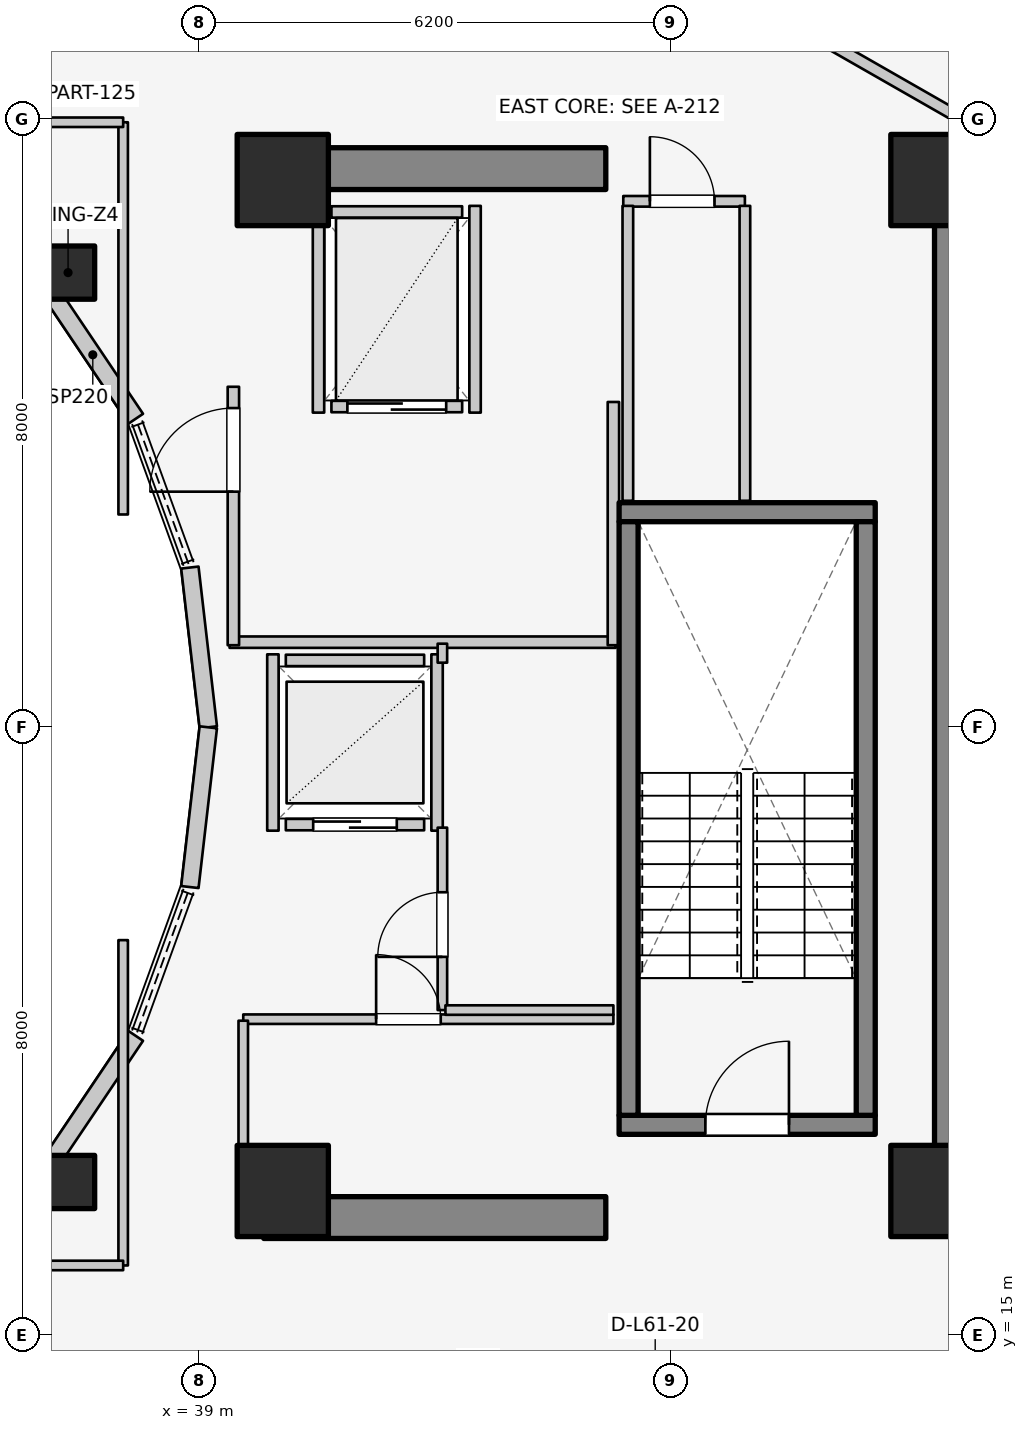
"""IFC4 building model, lengths in metres.
Left out: names, types, materials, properties, quantities, classifications, styles, units other than length and angle.
Written with IfcOpenShell. Run it as: python <this file> out.ifc"""

import sys

from ifc_helpers import new_model, si_unit, direction, frame, frame_2d, origin, origin_2d, place, context, subcontext, project, spatial, rectangle, extrude, element, fill, save


model = new_model("IFC4")
c1 = context("Model", 3, precision=1e-05, world=origin(), true_north=direction((0.0, 1.0)))
c2 = subcontext(c1, "Body", "Model", "MODEL_VIEW")
j1 = project(units=[si_unit("LENGTHUNIT", "METRE"), si_unit("PLANEANGLEUNIT", "RADIAN")], contexts=[c1])
p1 = place(None, origin())
s1 = spatial("IfcSite", under=j1, at=p1, CompositionType="ELEMENT")
p2 = place(p1, origin())
s2 = spatial("IfcBuilding", under=s1, at=p2, CompositionType="ELEMENT")
p3 = place(p2, frame((0.0, 0.0, 201.6)))
s3 = spatial("IfcBuildingStorey", under=s2, at=p3, CompositionType="ELEMENT", Elevation=201.6)
p4 = place(p3, frame((48.95, 17.05, 0.0), z_axis=(0.0, 0.0, 1.0), x_axis=(0.0, 1.0, 0.0)))
e1 = element("IfcWall", 1, at=p4, inside=s3, PredefinedType="SHEAR", context=c2, shape_type="SweptSolid", body=[
    extrude(rectangle(XDim=12.8, YDim=0.55, at=frame_2d((6.4, 0.0))), origin(), (0.0, 0.0, 1.0), 3.1),
])
for number, where, z_axis, x_axis in (
    (2, (39.85, 16.55, 0.0), (0.0, 0.0, 1.0), (1.0, 0.0, 0.0)),
    (3, (39.85, 30.35, 0.0), (0.0, 0.0, 1.0), (1.0, 0.0, 0.0)),
):
    element("IfcWall", number, at=place(p3, frame(where, z_axis=z_axis, x_axis=x_axis)), inside=s3, PredefinedType="SHEAR", context=c2, shape_type="SweptSolid", body=[
        extrude(rectangle(XDim=4.5, YDim=0.55, at=frame_2d((2.25, 0.0))), origin(), (0.0, 0.0, 1.0), 3.1),
    ])
p5 = place(p3, frame((44.525, 17.77, 0.0), z_axis=(0.0, 0.0, 1.0), x_axis=(1.0, 0.0, 0.0)))
e4 = element("IfcWall", 4, at=p5, inside=s3, PredefinedType="SOLIDWALL", context=c2, shape_type="SweptSolid", body=[
    extrude(rectangle(XDim=3.37, YDim=0.25, at=frame_2d((1.685, 0.0))), origin(), (0.0, 0.0, 1.0), 3.1),
])
p6 = place(p5, frame((1.135, 0.0, 0.0)))
e5 = element("IfcOpeningElement", 5, at=p6, cuts=e4, PredefinedType="OPENING", context=c2, shape_type="SweptSolid", body=[
    extrude(rectangle(XDim=1.1, YDim=2.1, at=frame_2d((0.55, 1.05))), frame((0.0, 0.135, 0.0), z_axis=(0.0, -1.0, 0.0), x_axis=(1.0, 0.0, 0.0)), (0.0, 0.0, 1.0), 0.27),
])
p7 = place(p3, frame((44.525, 25.83, 0.0), z_axis=(0.0, 0.0, 1.0), x_axis=(1.0, 0.0, 0.0)))
e6 = element("IfcWall", 6, at=p7, inside=s3, PredefinedType="SOLIDWALL", context=c2, shape_type="SweptSolid", body=[
    extrude(rectangle(XDim=3.37, YDim=0.25, at=frame_2d((1.685, 0.0))), origin(), (0.0, 0.0, 1.0), 3.1),
])
for number, where, z_axis, x_axis in (
    (7, (44.65, 17.895, 0.0), (0.0, 0.0, 1.0), (0.0, 1.0, 0.0)),
    (8, (47.77, 17.895, 0.0), (0.0, 0.0, 1.0), (0.0, 1.0, 0.0)),
):
    element("IfcWall", number, at=place(p3, frame(where, z_axis=z_axis, x_axis=x_axis)), inside=s3, PredefinedType="SOLIDWALL", context=c2, shape_type="SweptSolid", body=[
        extrude(rectangle(XDim=7.81, YDim=0.25, at=frame_2d((3.905, 0.0))), origin(), (0.0, 0.0, 1.0), 3.1),
    ])
for number, where, z_axis, x_axis in (
    (9, (40.1, 16.9, 0.0), (0.0, 0.0, 1.0), (1.0, 0.0, 0.0)),
    (10, (48.7, 16.9, 0.0), (0.0, 0.0, 1.0), (1.0, 0.0, 0.0)),
    (11, (48.7, 30.2, 0.0), (0.0, 0.0, 1.0), (1.0, 0.0, 0.0)),
    (12, (40.1, 30.2, 0.0), (0.0, 0.0, 1.0), (1.0, 0.0, 0.0)),
):
    element("IfcColumn", number, at=place(p3, frame(where, z_axis=z_axis, x_axis=x_axis)), inside=s3, PredefinedType="COLUMN", context=c2, shape_type="SweptSolid", body=[
        extrude(rectangle(XDim=1.2, YDim=1.2, at=origin_2d()), origin(), (0.0, 0.0, 1.0), 3.1),
    ])
for number, where, z_axis, x_axis in (
    (13, (37.275, 28.982, 0.0), (0.0, 0.0, 1.0), (1.0, 0.0, 0.0)),
    (14, (37.275, 17.018, 0.0), (0.0, 0.0, 1.0), (1.0, 0.0, 0.0)),
):
    element("IfcColumn", number, at=place(p3, frame(where, z_axis=z_axis, x_axis=x_axis)), inside=s3, PredefinedType="COLUMN", context=c2, shape_type="SweptSolid", body=[
        extrude(rectangle(XDim=0.7, YDim=0.7, at=origin_2d()), origin(), (0.0, 0.0, 1.0), 3.1),
    ])
p8 = place(p3, frame((39.12, 23.0, 0.0), z_axis=(0.0, 0.0, 1.0), x_axis=(-0.114711713601, 0.993398823617, 0.0)))
e15 = element("IfcWall", 15, at=p8, inside=s3, PredefinedType="STANDARD", context=c2, shape_type="SweptSolid", body=[
    extrude(rectangle(XDim=2.115, YDim=0.23, at=frame_2d((1.058, 0.0))), origin(), (0.0, 0.0, 1.0), 2.84),
])
p9 = place(p3, frame((38.166, 27.06, 0.0), z_axis=(0.0, 0.0, 1.0), x_axis=(-0.558197800898, 0.829707909492, 0.0)))
e16 = element("IfcWall", 16, at=p9, inside=s3, PredefinedType="STANDARD", context=c2, shape_type="SweptSolid", body=[
    extrude(rectangle(XDim=2.027, YDim=0.23, at=frame_2d((1.013, 0.0))), origin(), (0.0, 0.0, 1.0), 2.16),
])
for number, where, z_axis, x_axis in (
    (17, (37.035, 28.742, 0.0), (0.0, 0.0, 1.0), (-0.753, 0.659, 0.0)),
    (18, (35.56, 15.968, 0.0), (0.0, 0.0, 1.0), (0.753, 0.659, 0.0)),
):
    element("IfcWall", number, at=place(p3, frame(where, z_axis=z_axis, x_axis=x_axis)), inside=s3, PredefinedType="STANDARD", context=c2, shape_type="SweptSolid", body=[
        extrude(rectangle(XDim=1.959, YDim=0.23, at=frame_2d((0.98, 0.0))), origin(), (0.0, 0.0, 1.0), 2.16),
    ])
p10 = place(p3, frame((37.035, 17.258, 0.0), z_axis=(0.0, 0.0, 1.0), x_axis=(0.558197800898, 0.829707909492, 0.0)))
e19 = element("IfcWall", 19, at=p10, inside=s3, PredefinedType="STANDARD", context=c2, shape_type="SweptSolid", body=[
    extrude(rectangle(XDim=2.027, YDim=0.23, at=frame_2d((1.013, 0.0))), origin(), (0.0, 0.0, 1.0), 2.16),
])
p11 = place(p3, frame((38.877, 20.898, 0.0), z_axis=(0.0, 0.0, 1.0), x_axis=(0.114711713601, 0.993398823617, 0.0)))
e20 = element("IfcWall", 20, at=p11, inside=s3, PredefinedType="STANDARD", context=c2, shape_type="SweptSolid", body=[
    extrude(rectangle(XDim=2.115, YDim=0.23, at=frame_2d((1.058, 0.0))), origin(), (0.0, 0.0, 1.0), 2.84),
])
p12 = place(p3, frame((50.761, 31.809, 0.0), z_axis=(0.0, 0.0, 1.0), x_axis=(-0.792713817907, 0.609593965603, 0.0)))
e21 = element("IfcWall", 21, at=p12, inside=s3, PredefinedType="STANDARD", context=c2, shape_type="SweptSolid", body=[
    extrude(rectangle(XDim=4.041, YDim=0.26, at=frame_2d((2.021, 0.0))), origin(), (0.0, 0.0, 1.0), 2.85),
])
p13 = place(p12, frame((1.271, 0.0, 0.75)))
e22 = element("IfcOpeningElement", 22, at=p13, cuts=e21, PredefinedType="OPENING", context=c2, shape_type="SweptSolid", body=[
    extrude(rectangle(XDim=1.5, YDim=1.6, at=frame_2d((0.75, 0.8))), frame((0.0, 0.14, 0.0), z_axis=(0.0, -1.0, 0.0), x_axis=(1.0, 0.0, 0.0)), (0.0, 0.0, 1.0), 0.28),
])
p14 = place(p3, frame((40.14, 21.72, 0.0), z_axis=(0.0, 0.0, 1.0), x_axis=(1.0, 0.0, 0.0)))
e23 = element("IfcWall", 23, at=p14, inside=s3, PredefinedType="SOLIDWALL", context=c2, shape_type="SweptSolid", body=[
    extrude(rectangle(XDim=1.82, YDim=0.15, at=frame_2d((0.91, 0.0))), origin(), (0.0, 0.0, 1.0), 2.12),
])
p15 = place(p14, frame((0.36, 0.0, 0.0)))
e24 = element("IfcOpeningElement", 24, at=p15, cuts=e23, PredefinedType="OPENING", context=c2, shape_type="SweptSolid", body=[
    extrude(rectangle(XDim=1.1, YDim=2.1, at=frame_2d((0.55, 1.05))), frame((0.0, 0.085, 0.0), z_axis=(0.0, -1.0, 0.0), x_axis=(1.0, 0.0, 0.0)), (0.0, 0.0, 1.0), 0.17),
])
p16 = place(p3, frame((40.14, 23.88, 0.0), z_axis=(0.0, 0.0, 1.0), x_axis=(1.0, 0.0, 0.0)))
e25 = element("IfcWall", 25, at=p16, inside=s3, PredefinedType="SOLIDWALL", context=c2, shape_type="SweptSolid", body=[
    extrude(rectangle(XDim=1.82, YDim=0.15, at=frame_2d((0.91, 0.0))), origin(), (0.0, 0.0, 1.0), 2.12),
])
p17 = place(p3, frame((39.97, 21.64, 0.0), z_axis=(0.0, 0.0, 1.0), x_axis=(0.0, 1.0, 0.0)))
e26 = element("IfcWall", 26, at=p17, inside=s3, PredefinedType="SOLIDWALL", context=c2, shape_type="SweptSolid", body=[
    extrude(rectangle(XDim=2.32, YDim=0.15, at=frame_2d((1.16, 0.0))), origin(), (0.0, 0.0, 1.0), 2.12),
])
p18 = place(p3, frame((42.13, 21.64, 0.0), z_axis=(0.0, 0.0, 1.0), x_axis=(0.0, 1.0, 0.0)))
e27 = element("IfcWall", 27, at=p18, inside=s3, PredefinedType="SOLIDWALL", context=c2, shape_type="SweptSolid", body=[
    extrude(rectangle(XDim=2.32, YDim=0.15, at=frame_2d((1.16, 0.0))), origin(), (0.0, 0.0, 1.0), 2.855),
])
p19 = place(p3, frame((40.74, 27.22, 0.0), z_axis=(0.0, 0.0, 1.0), x_axis=(1.0, 0.0, 0.0)))
e28 = element("IfcWall", 28, at=p19, inside=s3, PredefinedType="SOLIDWALL", context=c2, shape_type="SweptSolid", body=[
    extrude(rectangle(XDim=1.72, YDim=0.15, at=frame_2d((0.86, 0.0))), origin(), (0.0, 0.0, 1.0), 2.855),
])
p20 = place(p19, frame((0.21, 0.0, 0.0)))
e29 = element("IfcOpeningElement", 29, at=p20, cuts=e28, PredefinedType="OPENING", context=c2, shape_type="SweptSolid", body=[
    extrude(rectangle(XDim=1.3, YDim=2.1, at=frame_2d((0.65, 1.05))), frame((0.0, 0.085, 0.0), z_axis=(0.0, -1.0, 0.0), x_axis=(1.0, 0.0, 0.0)), (0.0, 0.0, 1.0), 0.17),
])
p21 = place(p3, frame((40.74, 29.78, 0.0), z_axis=(0.0, 0.0, 1.0), x_axis=(1.0, 0.0, 0.0)))
e30 = element("IfcWall", 30, at=p21, inside=s3, PredefinedType="SOLIDWALL", context=c2, shape_type="SweptSolid", body=[
    extrude(rectangle(XDim=1.72, YDim=0.15, at=frame_2d((0.86, 0.0))), origin(), (0.0, 0.0, 1.0), 2.855),
])
for number, where, z_axis, x_axis in (
    (31, (40.57, 27.14, 0.0), (0.0, 0.0, 1.0), (0.0, 1.0, 0.0)),
    (32, (42.63, 27.14, 0.0), (0.0, 0.0, 1.0), (0.0, 1.0, 0.0)),
):
    element("IfcWall", number, at=place(p3, frame(where, z_axis=z_axis, x_axis=x_axis)), inside=s3, PredefinedType="SOLIDWALL", context=c2, shape_type="SweptSolid", body=[
        extrude(rectangle(XDim=2.72, YDim=0.15, at=frame_2d((1.36, 0.0))), origin(), (0.0, 0.0, 1.0), 2.855),
    ])
p22 = place(p3, frame((39.4, 24.12, 0.0), z_axis=(0.0, 0.0, 1.0), x_axis=(1.0, 0.0, 0.0)))
e33 = element("IfcWall", 33, at=p22, inside=s3, PredefinedType="PARTITIONING", context=c2, shape_type="SweptSolid", body=[
    extrude(rectangle(XDim=5.08, YDim=0.15, at=frame_2d((2.54, 0.0))), origin(), (0.0, 0.0, 1.0), 2.12),
])
p23 = place(p3, frame((44.45, 24.08, 0.0), z_axis=(0.0, 0.0, 1.0), x_axis=(0.0, 1.0, 0.0)))
e34 = element("IfcWall", 34, at=p23, inside=s3, PredefinedType="PARTITIONING", context=c2, shape_type="SweptSolid", body=[
    extrude(rectangle(XDim=3.2, YDim=0.15, at=frame_2d((1.6, 0.0))), origin(), (0.0, 0.0, 1.0), 2.855),
])
p24 = place(p3, frame((39.45, 24.08, 0.0), z_axis=(0.0, 0.0, 1.0), x_axis=(0.0, 1.0, 0.0)))
e35 = element("IfcWall", 35, at=p24, inside=s3, PredefinedType="PARTITIONING", context=c2, shape_type="SweptSolid", body=[
    extrude(rectangle(XDim=3.4, YDim=0.15, at=frame_2d((1.7, 0.0))), origin(), (0.0, 0.0, 1.0), 2.855),
])
p25 = place(p24, frame((2.02, 0.0, 0.0)))
e36 = element("IfcOpeningElement", 36, at=p25, cuts=e35, PredefinedType="OPENING", context=c2, shape_type="SweptSolid", body=[
    extrude(rectangle(XDim=1.1, YDim=2.1, at=frame_2d((0.55, 1.05))), frame((0.0, 0.085, 0.0), z_axis=(0.0, -1.0, 0.0), x_axis=(1.0, 0.0, 0.0)), (0.0, 0.0, 1.0), 0.17),
])
p26 = place(p3, frame((39.58, 19.16, 0.0), z_axis=(0.0, 0.0, 1.0), x_axis=(1.0, 0.0, 0.0)))
e37 = element("IfcWall", 37, at=p26, inside=s3, PredefinedType="PARTITIONING", context=c2, shape_type="SweptSolid", body=[
    extrude(rectangle(XDim=4.87, YDim=0.125, at=frame_2d((2.435, 0.0))), origin(), (0.0, 0.0, 1.0), 2.12),
])
p27 = place(p26, frame((1.748, 0.0, 0.0)))
e38 = element("IfcOpeningElement", 38, at=p27, cuts=e37, PredefinedType="OPENING", context=c2, shape_type="SweptSolid", body=[
    extrude(rectangle(XDim=0.85, YDim=2.05, at=frame_2d((0.425, 1.025))), frame((0.0, 0.073, 0.0), z_axis=(0.0, -1.0, 0.0), x_axis=(1.0, 0.0, 0.0)), (0.0, 0.0, 1.0), 0.145),
])
p28 = place(p3, frame((39.58, 17.1, 0.0), z_axis=(0.0, 0.0, 1.0), x_axis=(0.0, 1.0, 0.0)))
e39 = element("IfcWall", 39, at=p28, inside=s3, PredefinedType="PARTITIONING", context=c2, shape_type="SweptSolid", body=[
    extrude(rectangle(XDim=2.04, YDim=0.125, at=frame_2d((1.02, 0.0))), origin(), (0.0, 0.0, 1.0), 2.232),
])
p29 = place(p3, frame((42.2, 19.28, 0.0), z_axis=(0.0, 0.0, 1.0), x_axis=(0.0, 1.0, 0.0)))
e40 = element("IfcWall", 40, at=p29, inside=s3, PredefinedType="PARTITIONING", context=c2, shape_type="SweptSolid", body=[
    extrude(rectangle(XDim=2.4, YDim=0.125, at=frame_2d((1.2, 0.0))), origin(), (0.0, 0.0, 1.0), 2.855),
])
p30 = place(p29, frame((0.7, 0.0, 0.0)))
e41 = element("IfcOpeningElement", 41, at=p30, cuts=e40, PredefinedType="OPENING", context=c2, shape_type="SweptSolid", body=[
    extrude(rectangle(XDim=0.85, YDim=2.05, at=frame_2d((0.425, 1.025))), frame((0.0, 0.073, 0.0), z_axis=(0.0, -1.0, 0.0), x_axis=(1.0, 0.0, 0.0)), (0.0, 0.0, 1.0), 0.145),
])
p31 = place(p3, frame((42.2, 23.85, 0.0), z_axis=(0.0, 0.0, 1.0), x_axis=(0.0, 1.0, 0.0)))
e42 = element("IfcWall", 42, at=p31, inside=s3, PredefinedType="PARTITIONING", context=c2, shape_type="SweptSolid", body=[
    extrude(rectangle(XDim=0.25, YDim=0.125, at=frame_2d((0.125, 0.0))), origin(), (0.0, 0.0, 1.0), 2.855),
])
p32 = place(p3, frame((42.24, 19.28, 0.0), z_axis=(0.0, 0.0, 1.0), x_axis=(1.0, 0.0, 0.0)))
e43 = element("IfcWall", 43, at=p32, inside=s3, PredefinedType="PARTITIONING", context=c2, shape_type="SweptSolid", body=[
    extrude(rectangle(XDim=2.21, YDim=0.125, at=frame_2d((1.105, 0.0))), origin(), (0.0, 0.0, 1.0), 2.12),
])
p33 = place(p3, frame((44.58, 29.92, 0.0), z_axis=(0.0, 0.0, 1.0), x_axis=(1.0, 0.0, 0.0)))
e44 = element("IfcWall", 44, at=p33, inside=s3, PredefinedType="PLUMBINGWALL", context=c2, shape_type="SweptSolid", body=[
    extrude(rectangle(XDim=1.6, YDim=0.14, at=frame_2d((0.8, 0.0))), origin(), (0.0, 0.0, 1.0), 2.855),
])
p34 = place(p33, frame((0.35, 0.0, 0.0)))
e45 = element("IfcOpeningElement", 45, at=p34, cuts=e44, PredefinedType="OPENING", context=c2, shape_type="SweptSolid", body=[
    extrude(rectangle(XDim=0.85, YDim=2.05, at=frame_2d((0.425, 1.025))), frame((0.0, 0.08, 0.0), z_axis=(0.0, -1.0, 0.0), x_axis=(1.0, 0.0, 0.0)), (0.0, 0.0, 1.0), 0.16),
])
for number, where, z_axis, x_axis in (
    (46, (44.64, 25.98, 0.0), (0.0, 0.0, 1.0), (0.0, 1.0, 0.0)),
    (47, (46.18, 25.98, 0.0), (0.0, 0.0, 1.0), (0.0, 1.0, 0.0)),
):
    element("IfcWall", number, at=place(p3, frame(where, z_axis=z_axis, x_axis=x_axis)), inside=s3, PredefinedType="PLUMBINGWALL", context=c2, shape_type="SweptSolid", body=[
        extrude(rectangle(XDim=3.88, YDim=0.14, at=frame_2d((1.94, 0.0))), origin(), (0.0, 0.0, 1.0), 2.855),
    ])
p35 = place(p3, frame((35.55, 30.015, 0.0), z_axis=(0.0, 0.0, 1.0), x_axis=(0.523992004803, 0.851723182086, 0.0)))
e48 = element("IfcWall", 48, at=p35, inside=s3, PredefinedType="PARTITIONING", context=c2, shape_type="SweptSolid", body=[
    extrude(rectangle(XDim=3.101, YDim=0.125, at=frame_2d((1.551, 0.0))), origin(), (0.0, 0.0, 1.0), 2.376),
])
p36 = place(p3, frame((38.0, 25.8, 0.0), z_axis=(0.0, 0.0, 1.0), x_axis=(0.0, 1.0, 0.0)))
e49 = element("IfcWall", 49, at=p36, inside=s3, PredefinedType="PARTITIONING", context=c2, shape_type="SweptSolid", body=[
    extrude(rectangle(XDim=5.16, YDim=0.125, at=frame_2d((2.58, 0.0))), origin(), (0.0, 0.0, 1.0), 2.232),
])
p37 = place(p3, frame((35.4, 30.96, 0.0), z_axis=(0.0, 0.0, 1.0), x_axis=(1.0, 0.0, 0.0)))
e50 = element("IfcWall", 50, at=p37, inside=s3, PredefinedType="PARTITIONING", context=c2, shape_type="SweptSolid", body=[
    extrude(rectangle(XDim=2.6, YDim=0.125, at=frame_2d((1.3, 0.0))), origin(), (0.0, 0.0, 1.0), 2.376),
])
p38 = place(p3, frame((38.0, 15.92, 0.0), z_axis=(0.0, 0.0, 1.0), x_axis=(0.0, 1.0, 0.0)))
e51 = element("IfcWall", 51, at=p38, inside=s3, PredefinedType="PARTITIONING", context=c2, shape_type="SweptSolid", body=[
    extrude(rectangle(XDim=4.28, YDim=0.125, at=frame_2d((2.14, 0.0))), origin(), (0.0, 0.0, 1.0), 2.232),
])
p39 = place(p3, frame((35.4, 15.92, 0.0), z_axis=(0.0, 0.0, 1.0), x_axis=(1.0, 0.0, 0.0)))
e52 = element("IfcWall", 52, at=p39, inside=s3, PredefinedType="PARTITIONING", context=c2, shape_type="SweptSolid", body=[
    extrude(rectangle(XDim=2.6, YDim=0.125, at=frame_2d((1.3, 0.0))), origin(), (0.0, 0.0, 1.0), 2.232),
])
p40 = place(p3, frame((46.757, 32.305, 0.0), z_axis=(0.0, 0.0, 1.0), x_axis=(0.867991349648, -0.496579315857, 0.0)))
e53 = element("IfcWall", 53, at=p40, inside=s3, PredefinedType="PARTITIONING", context=c2, shape_type="SweptSolid", body=[
    extrude(rectangle(XDim=2.567, YDim=0.15, at=frame_2d((1.283, 0.0))), origin(), (0.0, 0.0, 1.0), 2.22),
])
p41 = place(p6, origin())
e54 = element("IfcDoor", 54, at=p41, inside=s3, OperationType="SINGLE_SWING_RIGHT", PredefinedType="DOOR", context=c2, shape_type="SweptSolid", body=[
    extrude(rectangle(XDim=1.1, YDim=2.1, at=frame_2d((0.55, 1.05))), frame((0.0, 0.025, 0.0), z_axis=(0.0, -1.0, 0.0), x_axis=(1.0, 0.0, 0.0)), (0.0, 0.0, 1.0), 0.05),
])
fill(e5, e54)
p42 = place(p15, origin())
e55 = element("IfcDoor", 55, at=p42, inside=s3, OperationType="DOUBLE_DOOR_SLIDING", PredefinedType="DOOR", context=c2, shape_type="SweptSolid", body=[
    extrude(rectangle(XDim=1.1, YDim=2.1, at=frame_2d((0.55, 1.05))), frame((0.0, 0.025, 0.0), z_axis=(0.0, -1.0, 0.0), x_axis=(1.0, 0.0, 0.0)), (0.0, 0.0, 1.0), 0.05),
])
fill(e24, e55)
p43 = place(p20, origin())
e56 = element("IfcDoor", 56, at=p43, inside=s3, OperationType="DOUBLE_DOOR_SLIDING", PredefinedType="DOOR", context=c2, shape_type="SweptSolid", body=[
    extrude(rectangle(XDim=1.3, YDim=2.1, at=frame_2d((0.65, 1.05))), frame((0.0, 0.025, 0.0), z_axis=(0.0, -1.0, 0.0), x_axis=(1.0, 0.0, 0.0)), (0.0, 0.0, 1.0), 0.05),
])
fill(e29, e56)
p44 = place(p25, origin())
e57 = element("IfcDoor", 57, at=p44, inside=s3, OperationType="SINGLE_SWING_LEFT", PredefinedType="DOOR", context=c2, shape_type="SweptSolid", body=[
    extrude(rectangle(XDim=1.1, YDim=2.1, at=frame_2d((0.55, 1.05))), frame((0.0, 0.025, 0.0), z_axis=(0.0, -1.0, 0.0), x_axis=(1.0, 0.0, 0.0)), (0.0, 0.0, 1.0), 0.05),
])
fill(e36, e57)
p45 = place(p27, origin())
e58 = element("IfcDoor", 58, at=p45, inside=s3, OperationType="SINGLE_SWING_LEFT", PredefinedType="DOOR", context=c2, shape_type="SweptSolid", body=[
    extrude(rectangle(XDim=0.85, YDim=2.05, at=frame_2d((0.425, 1.025))), frame((0.0, 0.025, 0.0), z_axis=(0.0, -1.0, 0.0), x_axis=(1.0, 0.0, 0.0)), (0.0, 0.0, 1.0), 0.05),
])
fill(e38, e58)
p46 = place(p30, origin())
e59 = element("IfcDoor", 59, at=p46, inside=s3, OperationType="SINGLE_SWING_LEFT", PredefinedType="DOOR", context=c2, shape_type="SweptSolid", body=[
    extrude(rectangle(XDim=0.85, YDim=2.05, at=frame_2d((0.425, 1.025))), frame((0.0, 0.025, 0.0), z_axis=(0.0, -1.0, 0.0), x_axis=(1.0, 0.0, 0.0)), (0.0, 0.0, 1.0), 0.05),
])
fill(e41, e59)
p47 = place(p34, origin())
e60 = element("IfcDoor", 60, at=p47, inside=s3, OperationType="SINGLE_SWING_LEFT", PredefinedType="DOOR", context=c2, shape_type="SweptSolid", body=[
    extrude(rectangle(XDim=0.85, YDim=2.05, at=frame_2d((0.425, 1.025))), frame((0.0, 0.025, 0.0), z_axis=(0.0, -1.0, 0.0), x_axis=(1.0, 0.0, 0.0)), (0.0, 0.0, 1.0), 0.05),
])
fill(e45, e60)
save(model, sys.argv[1])
